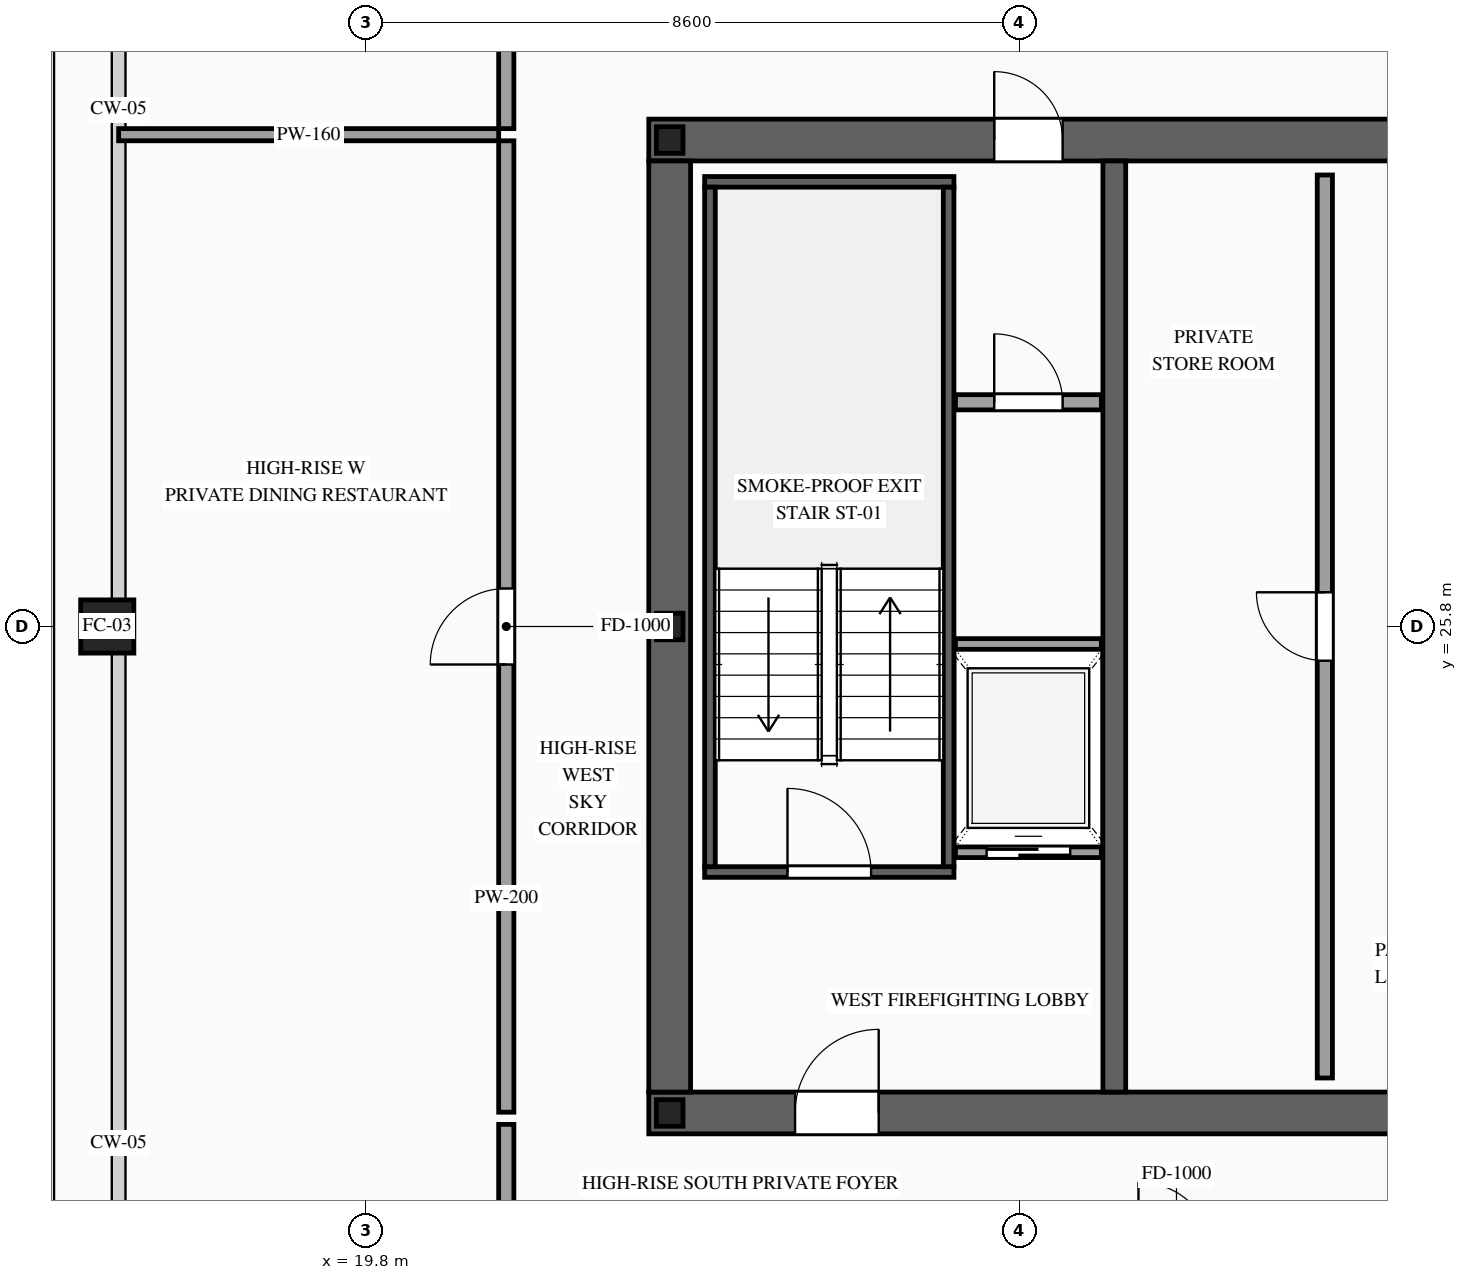
"""IFC4 building model, lengths in metres.
Left out: names, types, materials, properties, quantities, classifications, styles, units other than length and angle.
Written with IfcOpenShell. Run it as: python <this file> out.ifc"""

import sys

from ifc_helpers import new_model, si_unit, direction, frame, frame_2d, origin, origin_2d, place, context, subcontext, project, spatial, rectangle, hollow_rectangle, i_section, extrude, source, transform, mapped, element, fill, save


model = new_model("IFC4")
c1 = context("Model", 3, precision=1e-05, world=origin(), true_north=direction((0.0, 1.0)))
c2 = subcontext(c1, "Body", "Model", "MODEL_VIEW")
j1 = project(units=[si_unit("LENGTHUNIT", "METRE"), si_unit("PLANEANGLEUNIT", "RADIAN")], contexts=[c1])
p1 = place(None, origin())
s1 = spatial("IfcSite", under=j1, at=p1, CompositionType="ELEMENT")
p2 = place(p1, origin())
s2 = spatial("IfcBuilding", under=s1, at=p2, CompositionType="ELEMENT")
p3 = place(p2, frame((0.0, 0.0, 278.6)))
s3 = spatial("IfcBuildingStorey", under=s2, at=p3, CompositionType="ELEMENT", Elevation=278.6)
p4 = place(p3, frame((23.525, 19.4, 0.0), z_axis=(0.0, 0.0, 1.0), x_axis=(1.0, 0.0, 0.0)))
e1 = element("IfcWall", 1, at=p4, inside=s3, PredefinedType="SHEAR", context=c2, shape_type="SweptSolid", body=[
    extrude(rectangle(XDim=26.95, YDim=0.55, at=frame_2d((13.475, 0.0))), origin(), (0.0, 0.0, 1.0), 3.5),
])
p5 = place(p4, frame((1.925, 0.0, 0.0)))
e2 = element("IfcOpeningElement", 2, at=p5, cuts=e1, PredefinedType="OPENING", context=c2, shape_type="SweptSolid", body=[
    extrude(rectangle(XDim=1.1, YDim=2.2, at=frame_2d((0.55, 1.1))), frame((0.0, 0.29, 0.0), z_axis=(0.0, -1.0, 0.0), x_axis=(1.0, 0.0, 0.0)), (0.0, 0.0, 1.0), 0.58),
])
p6 = place(p4, frame((9.825, 0.0, 0.0)))
e3 = element("IfcOpeningElement", 3, at=p6, cuts=e1, PredefinedType="OPENING", context=c2, shape_type="SweptSolid", body=[
    extrude(rectangle(XDim=1.1, YDim=2.2, at=frame_2d((0.55, 1.1))), frame((0.0, 0.29, 0.0), z_axis=(0.0, -1.0, 0.0), x_axis=(1.0, 0.0, 0.0)), (0.0, 0.0, 1.0), 0.58),
])
p7 = place(p4, frame((23.025, 0.0, 0.0)))
e4 = element("IfcOpeningElement", 4, at=p7, cuts=e1, PredefinedType="OPENING", context=c2, shape_type="SweptSolid", body=[
    extrude(rectangle(XDim=1.1, YDim=2.2, at=frame_2d((0.55, 1.1))), frame((0.0, 0.29, 0.0), z_axis=(0.0, -1.0, 0.0), x_axis=(1.0, 0.0, 0.0)), (0.0, 0.0, 1.0), 0.58),
])
p8 = place(p4, frame((19.645, 0.0, 0.0)))
e5 = element("IfcOpeningElement", 5, at=p8, cuts=e1, PredefinedType="OPENING", context=c2, shape_type="SweptSolid", body=[
    extrude(rectangle(XDim=0.9, YDim=2.15, at=frame_2d((0.45, 1.075))), frame((0.0, 0.29, 0.0), z_axis=(0.0, -1.0, 0.0), x_axis=(1.0, 0.0, 0.0)), (0.0, 0.0, 1.0), 0.58),
])
p9 = place(p4, frame((18.205, 0.0, 0.0)))
e6 = element("IfcOpeningElement", 6, at=p9, cuts=e1, PredefinedType="OPENING", context=c2, shape_type="SweptSolid", body=[
    extrude(rectangle(XDim=0.9, YDim=2.15, at=frame_2d((0.45, 1.075))), frame((0.0, 0.29, 0.0), z_axis=(0.0, -1.0, 0.0), x_axis=(1.0, 0.0, 0.0)), (0.0, 0.0, 1.0), 0.58),
])
p10 = place(p3, frame((23.525, 32.2, 0.0), z_axis=(0.0, 0.0, 1.0), x_axis=(1.0, 0.0, 0.0)))
e7 = element("IfcWall", 7, at=p10, inside=s3, PredefinedType="SHEAR", context=c2, shape_type="SweptSolid", body=[
    extrude(rectangle(XDim=26.95, YDim=0.55, at=frame_2d((13.475, 0.0))), origin(), (0.0, 0.0, 1.0), 3.5),
])
p11 = place(p10, frame((4.545, 0.0, 0.0)))
e8 = element("IfcOpeningElement", 8, at=p11, cuts=e7, PredefinedType="OPENING", context=c2, shape_type="SweptSolid", body=[
    extrude(rectangle(XDim=0.9, YDim=2.15, at=frame_2d((0.45, 1.075))), frame((0.0, 0.29, 0.0), z_axis=(0.0, -1.0, 0.0), x_axis=(1.0, 0.0, 0.0)), (0.0, 0.0, 1.0), 0.58),
])
p12 = place(p10, frame((9.825, 0.0, 0.0)))
e9 = element("IfcOpeningElement", 9, at=p12, cuts=e7, PredefinedType="OPENING", context=c2, shape_type="SweptSolid", body=[
    extrude(rectangle(XDim=1.1, YDim=2.2, at=frame_2d((0.55, 1.1))), frame((0.0, 0.29, 0.0), z_axis=(0.0, -1.0, 0.0), x_axis=(1.0, 0.0, 0.0)), (0.0, 0.0, 1.0), 0.58),
])
p13 = place(p10, frame((15.675, 0.0, 0.0)))
e10 = element("IfcOpeningElement", 10, at=p13, cuts=e7, PredefinedType="OPENING", context=c2, shape_type="SweptSolid", body=[
    extrude(rectangle(XDim=1.1, YDim=2.2, at=frame_2d((0.55, 1.1))), frame((0.0, 0.29, 0.0), z_axis=(0.0, -1.0, 0.0), x_axis=(1.0, 0.0, 0.0)), (0.0, 0.0, 1.0), 0.58),
])
p14 = place(p10, frame((18.775, 0.0, 0.0)))
e11 = element("IfcOpeningElement", 11, at=p14, cuts=e7, PredefinedType="OPENING", context=c2, shape_type="SweptSolid", body=[
    extrude(rectangle(XDim=1.1, YDim=2.2, at=frame_2d((0.55, 1.1))), frame((0.0, 0.29, 0.0), z_axis=(0.0, -1.0, 0.0), x_axis=(1.0, 0.0, 0.0)), (0.0, 0.0, 1.0), 0.58),
])
m1 = source(origin(), c2, "Body", "SweptSolid", [
    extrude(rectangle(XDim=12.25, YDim=0.55, at=frame_2d((6.125, 0.0))), origin(), (0.0, 0.0, 1.0), 3.5),
])
p15 = place(p3, frame((23.8, 19.675, 0.0), z_axis=(0.0, 0.0, 1.0), x_axis=(0.0, 1.0, 0.0)))
e12 = element("IfcWall", 12, at=p15, inside=s3, PredefinedType="SHEAR", context=c2, shape_type="MappedRepresentation", body=[
    mapped(m1, transform((0.0, 0.0, 0.0), scale=1.0)),
])
m2 = source(origin(), c2, "Body", "SweptSolid", [
    extrude(rectangle(XDim=12.25, YDim=0.3, at=frame_2d((6.125, 0.0))), origin(), (0.0, 0.0, 1.0), 3.5),
])
p16 = place(p3, frame((29.65, 19.675, 0.0), z_axis=(0.0, 0.0, 1.0), x_axis=(0.0, 1.0, 0.0)))
e13 = element("IfcWall", 13, at=p16, inside=s3, PredefinedType="SOLIDWALL", context=c2, shape_type="MappedRepresentation", body=[
    mapped(m2, transform((0.0, 0.0, 0.0), scale=1.0)),
])
m3 = source(origin(), c2, "Body", "SweptSolid", [
    extrude(i_section(OverallWidth=0.35, OverallDepth=0.35, WebThickness=0.012, FlangeThickness=0.019, at=origin_2d()), origin(), (0.0, 0.0, 1.0), 3.5),
])
for number, where, z_axis, x_axis in (
    (14, (23.8, 19.4, 0.0), (0.0, 0.0, 1.0), (1.0, 0.0, 0.0)),
    (15, (23.8, 25.8, 0.0), (0.0, 0.0, 1.0), (1.0, 0.0, 0.0)),
    (16, (23.8, 32.2, 0.0), (0.0, 0.0, 1.0), (1.0, 0.0, 0.0)),
):
    element("IfcColumn", number, at=place(p3, frame(where, z_axis=z_axis, x_axis=x_axis)), inside=s3, PredefinedType="COLUMN", context=c2, shape_type="MappedRepresentation", body=[
        mapped(m3, transform((0.0, 0.0, 0.0), scale=1.0)),
    ])
m4 = source(origin(), c2, "Body", "SweptSolid", [
    extrude(hollow_rectangle(XDim=0.7, YDim=0.7, WallThickness=0.032, at=origin_2d()), origin(), (0.0, 0.0, 1.0), 3.5),
])
p17 = place(p3, frame((16.4, 25.8, 0.0), z_axis=(0.0, 0.0, 1.0), x_axis=(1.0, 0.0, 0.0)))
e17 = element("IfcColumn", 17, at=p17, inside=s3, PredefinedType="COLUMN", context=c2, shape_type="MappedRepresentation", body=[
    mapped(m4, transform((0.0, 0.0, 0.0), scale=1.0)),
])
p18 = place(p3, frame((27.56, 22.83, 0.0), z_axis=(0.0, 0.0, 1.0), x_axis=(1.0, 0.0, 0.0)))
e18 = element("IfcWall", 18, at=p18, inside=s3, PredefinedType="SOLIDWALL", context=c2, shape_type="SweptSolid", body=[
    extrude(rectangle(XDim=1.92, YDim=0.14, at=frame_2d((0.96, 0.0))), origin(), (0.0, 0.0, 1.0), 3.28),
])
p19 = place(p18, frame((0.41, 0.0, 0.0)))
e19 = element("IfcOpeningElement", 19, at=p19, cuts=e18, PredefinedType="OPENING", context=c2, shape_type="SweptSolid", body=[
    extrude(rectangle(XDim=1.1, YDim=2.2, at=frame_2d((0.55, 1.1))), frame((0.0, 0.085, 0.0), z_axis=(0.0, -1.0, 0.0), x_axis=(1.0, 0.0, 0.0)), (0.0, 0.0, 1.0), 0.17),
])
m5 = source(origin(), c2, "Body", "SweptSolid", [
    extrude(rectangle(XDim=1.92, YDim=0.14, at=frame_2d((0.96, 0.0))), origin(), (0.0, 0.0, 1.0), 3.28),
])
p20 = place(p3, frame((27.56, 25.57, 0.0), z_axis=(0.0, 0.0, 1.0), x_axis=(1.0, 0.0, 0.0)))
e20 = element("IfcWall", 20, at=p20, inside=s3, PredefinedType="SOLIDWALL", context=c2, shape_type="MappedRepresentation", body=[
    mapped(m5, transform((0.0, 0.0, 0.0), scale=1.0)),
])
p21 = place(p3, frame((24.26, 22.57, 0.0), z_axis=(0.0, 0.0, 1.0), x_axis=(1.0, 0.0, 0.0)))
e21 = element("IfcWall", 21, at=p21, inside=s3, PredefinedType="SOLIDWALL", context=c2, shape_type="SweptSolid", body=[
    extrude(rectangle(XDim=3.28, YDim=0.14, at=frame_2d((1.64, 0.0))), origin(), (0.0, 0.0, 1.0), 3.28),
])
p22 = place(p21, frame((1.09, 0.0, 0.0)))
e22 = element("IfcOpeningElement", 22, at=p22, cuts=e21, PredefinedType="OPENING", context=c2, shape_type="SweptSolid", body=[
    extrude(rectangle(XDim=1.1, YDim=2.2, at=frame_2d((0.55, 1.1))), frame((0.0, 0.085, 0.0), z_axis=(0.0, -1.0, 0.0), x_axis=(1.0, 0.0, 0.0)), (0.0, 0.0, 1.0), 0.17),
])
m6 = source(origin(), c2, "Body", "SweptSolid", [
    extrude(rectangle(XDim=3.28, YDim=0.14, at=frame_2d((1.64, 0.0))), origin(), (0.0, 0.0, 1.0), 3.28),
])
p23 = place(p3, frame((24.26, 31.65, 0.0), z_axis=(0.0, 0.0, 1.0), x_axis=(1.0, 0.0, 0.0)))
e23 = element("IfcWall", 23, at=p23, inside=s3, PredefinedType="SOLIDWALL", context=c2, shape_type="MappedRepresentation", body=[
    mapped(m6, transform((0.0, 0.0, 0.0), scale=1.0)),
])
m7 = source(origin(), c2, "Body", "SweptSolid", [
    extrude(rectangle(XDim=8.94, YDim=0.14, at=frame_2d((4.47, 0.0))), origin(), (0.0, 0.0, 1.0), 3.28),
])
for number, where, z_axis, x_axis in (
    (24, (24.33, 22.64, 0.0), (0.0, 0.0, 1.0), (0.0, 1.0, 0.0)),
    (25, (27.47, 22.64, 0.0), (0.0, 0.0, 1.0), (0.0, 1.0, 0.0)),
):
    element("IfcWall", number, at=place(p3, frame(where, z_axis=z_axis, x_axis=x_axis)), inside=s3, PredefinedType="SOLIDWALL", context=c2, shape_type="MappedRepresentation", body=[
        mapped(m7, transform((0.0, 0.0, 0.0), scale=1.0)),
    ])
p24 = place(p3, frame((27.56, 28.75, 0.0), z_axis=(0.0, 0.0, 1.0), x_axis=(1.0, 0.0, 0.0)))
e26 = element("IfcWall", 26, at=p24, inside=s3, PredefinedType="PARTITIONING", context=c2, shape_type="SweptSolid", body=[
    extrude(rectangle(XDim=1.92, YDim=0.2, at=frame_2d((0.96, 0.0))), origin(), (0.0, 0.0, 1.0), 3.28),
])
p25 = place(p24, frame((0.51, 0.0, 0.0)))
e27 = element("IfcOpeningElement", 27, at=p25, cuts=e26, PredefinedType="OPENING", context=c2, shape_type="SweptSolid", body=[
    extrude(rectangle(XDim=0.9, YDim=2.15, at=frame_2d((0.45, 1.075))), frame((0.0, 0.115, 0.0), z_axis=(0.0, -1.0, 0.0), x_axis=(1.0, 0.0, 0.0)), (0.0, 0.0, 1.0), 0.23),
])
p26 = place(p3, frame((32.42, 19.86, 0.0), z_axis=(0.0, 0.0, 1.0), x_axis=(0.0, 1.0, 0.0)))
e28 = element("IfcWall", 28, at=p26, inside=s3, PredefinedType="PARTITIONING", context=c2, shape_type="SweptSolid", body=[
    extrude(rectangle(XDim=11.88, YDim=0.2, at=frame_2d((5.94, 0.0))), origin(), (0.0, 0.0, 1.0), 3.28),
])
p27 = place(p26, frame((5.49, 0.0, 0.0)))
e29 = element("IfcOpeningElement", 29, at=p27, cuts=e28, PredefinedType="OPENING", context=c2, shape_type="SweptSolid", body=[
    extrude(rectangle(XDim=0.9, YDim=2.15, at=frame_2d((0.45, 1.075))), frame((0.0, 0.115, 0.0), z_axis=(0.0, -1.0, 0.0), x_axis=(1.0, 0.0, 0.0)), (0.0, 0.0, 1.0), 0.23),
])
m8 = source(origin(), c2, "Body", "SweptSolid", [
    extrude(rectangle(XDim=1.7, YDim=0.2, at=frame_2d((0.85, 0.0))), origin(), (0.0, 0.0, 1.0), 3.28),
])
for number, where, z_axis, x_axis in (
    (30, (21.65, 32.35, 0.0), (0.0, 0.0, 1.0), (0.0, 1.0, 0.0)),
    (31, (21.65, 17.55, 0.0), (0.0, 0.0, 1.0), (0.0, 1.0, 0.0)),
):
    element("IfcWall", number, at=place(p3, frame(where, z_axis=z_axis, x_axis=x_axis)), inside=s3, PredefinedType="PARTITIONING", context=c2, shape_type="MappedRepresentation", body=[
        mapped(m8, transform((0.0, 0.0, 0.0), scale=1.0)),
    ])
p28 = place(p3, frame((21.65, 19.41, 0.0), z_axis=(0.0, 0.0, 1.0), x_axis=(0.0, 1.0, 0.0)))
e32 = element("IfcWall", 32, at=p28, inside=s3, PredefinedType="PARTITIONING", context=c2, shape_type="SweptSolid", body=[
    extrude(rectangle(XDim=12.78, YDim=0.2, at=frame_2d((6.39, 0.0))), origin(), (0.0, 0.0, 1.0), 3.28),
])
p29 = place(p28, frame((5.89, 0.0, 0.0)))
e33 = element("IfcOpeningElement", 33, at=p29, cuts=e32, PredefinedType="OPENING", context=c2, shape_type="SweptSolid", body=[
    extrude(rectangle(XDim=1.0, YDim=2.2, at=frame_2d((0.5, 1.1))), frame((0.0, 0.115, 0.0), z_axis=(0.0, -1.0, 0.0), x_axis=(1.0, 0.0, 0.0)), (0.0, 0.0, 1.0), 0.23),
])
m9 = source(origin(), c2, "Body", "SweptSolid", [
    extrude(rectangle(XDim=5.0, YDim=0.16, at=frame_2d((2.5, 0.0))), origin(), (0.0, 0.0, 1.0), 2.825),
])
p30 = place(p3, frame((16.55, 32.27, 0.0), z_axis=(0.0, 0.0, 1.0), x_axis=(1.0, 0.0, 0.0)))
e34 = element("IfcWall", 34, at=p30, inside=s3, PredefinedType="PARTITIONING", context=c2, shape_type="MappedRepresentation", body=[
    mapped(m9, transform((0.0, 0.0, 0.0), scale=1.0)),
])
m10 = source(origin(), c2, "Body", "SweptSolid", [
    extrude(rectangle(XDim=1.1, YDim=2.2, at=frame_2d((0.55, 1.1))), frame((0.0, 0.025, 0.0), z_axis=(0.0, -1.0, 0.0), x_axis=(1.0, 0.0, 0.0)), (0.0, 0.0, 1.0), 0.05),
])
p31 = place(p19, origin())
e35 = element("IfcDoor", 35, at=p31, inside=s3, OperationType="SLIDING_TO_LEFT", PredefinedType="DOOR", context=c2, shape_type="MappedRepresentation", body=[
    mapped(m10, transform((0.0, 0.0, 0.0), scale=1.0)),
])
fill(e19, e35)
m11 = source(origin(), c2, "Body", "SweptSolid", [
    extrude(rectangle(XDim=1.1, YDim=2.2, at=frame_2d((0.55, 1.1))), frame((0.0, 0.025, 0.0), z_axis=(0.0, -1.0, 0.0), x_axis=(1.0, 0.0, 0.0)), (0.0, 0.0, 1.0), 0.05),
])
p32 = place(p22, origin())
e36 = element("IfcDoor", 36, at=p32, inside=s3, OperationType="SINGLE_SWING_LEFT", PredefinedType="DOOR", context=c2, shape_type="MappedRepresentation", body=[
    mapped(m11, transform((0.0, 0.0, 0.0), scale=1.0)),
])
fill(e22, e36)
p33 = place(p5, origin())
e37 = element("IfcDoor", 37, at=p33, inside=s3, OperationType="SINGLE_SWING_RIGHT", PredefinedType="DOOR", context=c2, shape_type="MappedRepresentation", body=[
    mapped(m11, transform((0.0, 0.0, 0.0), scale=1.0)),
])
fill(e2, e37)
m12 = source(origin(), c2, "Body", "SweptSolid", [
    extrude(rectangle(XDim=0.9, YDim=2.15, at=frame_2d((0.45, 1.075))), frame((0.0, 0.025, 0.0), z_axis=(0.0, -1.0, 0.0), x_axis=(1.0, 0.0, 0.0)), (0.0, 0.0, 1.0), 0.05),
])
p34 = place(p11, origin())
e38 = element("IfcDoor", 38, at=p34, inside=s3, OperationType="SINGLE_SWING_LEFT", PredefinedType="DOOR", context=c2, shape_type="MappedRepresentation", body=[
    mapped(m12, transform((0.0, 0.0, 0.0), scale=1.0)),
])
fill(e8, e38)
p35 = place(p25, origin())
e39 = element("IfcDoor", 39, at=p35, inside=s3, OperationType="SINGLE_SWING_LEFT", PredefinedType="DOOR", context=c2, shape_type="MappedRepresentation", body=[
    mapped(m12, transform((0.0, 0.0, 0.0), scale=1.0)),
])
fill(e27, e39)
p36 = place(p27, origin())
e40 = element("IfcDoor", 40, at=p36, inside=s3, OperationType="SINGLE_SWING_RIGHT", PredefinedType="DOOR", context=c2, shape_type="MappedRepresentation", body=[
    mapped(m12, transform((0.0, 0.0, 0.0), scale=1.0)),
])
fill(e29, e40)
m13 = source(origin(), c2, "Body", "SweptSolid", [
    extrude(rectangle(XDim=1.0, YDim=2.2, at=frame_2d((0.5, 1.1))), frame((0.0, 0.025, 0.0), z_axis=(0.0, -1.0, 0.0), x_axis=(1.0, 0.0, 0.0)), (0.0, 0.0, 1.0), 0.05),
])
p37 = place(p29, origin())
e41 = element("IfcDoor", 41, at=p37, inside=s3, OperationType="SINGLE_SWING_LEFT", PredefinedType="DOOR", context=c2, shape_type="MappedRepresentation", body=[
    mapped(m13, transform((0.0, 0.0, 0.0), scale=1.0)),
])
fill(e33, e41)
save(model, sys.argv[1])
